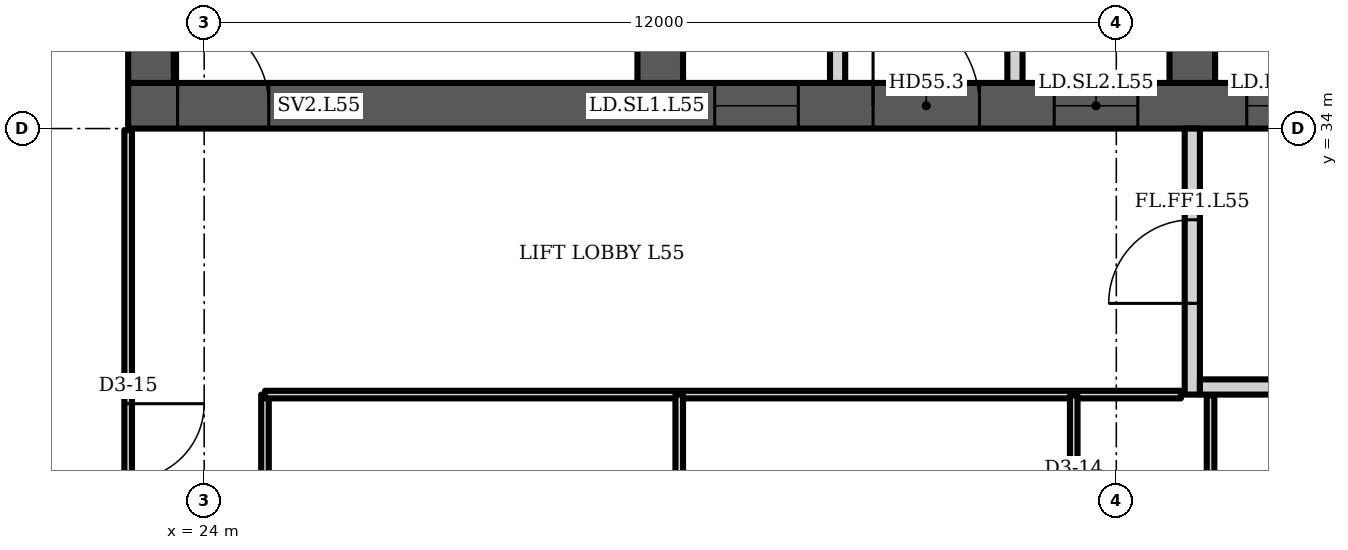
"""IFC4 building model, lengths in metres.
Left out: names, types, materials, properties, quantities, classifications, styles, units other than length and angle.
Written with IfcOpenShell. Run it as: python <this file> out.ifc"""

import sys

from ifc_helpers import new_model, si_unit, direction, frame, frame_2d, origin, place, context, subcontext, project, spatial, polyline, rectangle, outline, extrude, element, fill, save


model = new_model("IFC4")
c1 = context("Model", 3, precision=1e-05, world=origin(), true_north=direction((0.0, 1.0)))
c2 = subcontext(c1, "Body", "Model", "MODEL_VIEW")
j1 = project(units=[si_unit("LENGTHUNIT", "METRE"), si_unit("PLANEANGLEUNIT", "RADIAN")], contexts=[c1])
p1 = place(None, origin())
s1 = spatial("IfcSite", under=j1, at=p1, CompositionType="ELEMENT")
p2 = place(p1, origin())
s2 = spatial("IfcBuilding", under=s1, at=p2, CompositionType="ELEMENT")
p3 = place(p2, frame((0.0, 0.0, 221.5)))
s3 = spatial("IfcBuildingStorey", under=s2, at=p3, CompositionType="ELEMENT", Elevation=221.5)
p4 = place(p3, frame((23.0, 34.3, 0.0), z_axis=(0.0, 0.0, 1.0), x_axis=(1.0, 0.0, 0.0)))
e1 = element("IfcWall", 1, at=p4, inside=s3, PredefinedType="SHEAR", context=c2, shape_type="SweptSolid", body=[
    extrude(rectangle(XDim=35.0, YDim=0.6, at=frame_2d((17.5, 0.0))), origin(), (0.0, 0.0, 1.0), 3.6),
])
p5 = place(p4, frame((0.65, 0.0, 0.0)))
e2 = element("IfcOpeningElement", 2, at=p5, cuts=e1, PredefinedType="OPENING", context=c2, shape_type="SweptSolid", body=[
    extrude(rectangle(XDim=1.2, YDim=2.1, at=frame_2d((0.6, 1.05))), frame((0.0, 0.31, 0.0), z_axis=(0.0, -1.0, 0.0), x_axis=(1.0, 0.0, 0.0)), (0.0, 0.0, 1.0), 0.62),
])
p6 = place(p4, frame((7.717, 0.0, 0.0)))
e3 = element("IfcOpeningElement", 3, at=p6, cuts=e1, PredefinedType="OPENING", context=c2, shape_type="SweptSolid", body=[
    extrude(rectangle(XDim=1.1, YDim=2.1, at=frame_2d((0.55, 1.05))), frame((0.0, 0.31, 0.0), z_axis=(0.0, -1.0, 0.0), x_axis=(1.0, 0.0, 0.0)), (0.0, 0.0, 1.0), 0.62),
])
p7 = place(p4, frame((12.183, 0.0, 0.0)))
e4 = element("IfcOpeningElement", 4, at=p7, cuts=e1, PredefinedType="OPENING", context=c2, shape_type="SweptSolid", body=[
    extrude(rectangle(XDim=1.1, YDim=2.1, at=frame_2d((0.55, 1.05))), frame((0.0, 0.31, 0.0), z_axis=(0.0, -1.0, 0.0), x_axis=(1.0, 0.0, 0.0)), (0.0, 0.0, 1.0), 0.62),
])
p8 = place(p4, frame((9.8, 0.0, 0.0)))
e5 = element("IfcOpeningElement", 5, at=p8, cuts=e1, PredefinedType="OPENING", context=c2, shape_type="SweptSolid", body=[
    extrude(rectangle(XDim=1.4, YDim=2.1, at=frame_2d((0.7, 1.05))), frame((0.0, 0.31, 0.0), z_axis=(0.0, -1.0, 0.0), x_axis=(1.0, 0.0, 0.0)), (0.0, 0.0, 1.0), 0.62),
])
p9 = place(p4, frame((14.717, 0.0, 0.0)))
e6 = element("IfcOpeningElement", 6, at=p9, cuts=e1, PredefinedType="OPENING", context=c2, shape_type="SweptSolid", body=[
    extrude(rectangle(XDim=1.1, YDim=2.1, at=frame_2d((0.55, 1.05))), frame((0.0, 0.31, 0.0), z_axis=(0.0, -1.0, 0.0), x_axis=(1.0, 0.0, 0.0)), (0.0, 0.0, 1.0), 0.62),
])
p10 = place(p4, frame((16.95, 0.0, 0.0)))
e7 = element("IfcOpeningElement", 7, at=p10, cuts=e1, PredefinedType="OPENING", context=c2, shape_type="SweptSolid", body=[
    extrude(rectangle(XDim=1.1, YDim=2.1, at=frame_2d((0.55, 1.05))), frame((0.0, 0.31, 0.0), z_axis=(0.0, -1.0, 0.0), x_axis=(1.0, 0.0, 0.0)), (0.0, 0.0, 1.0), 0.62),
])
p11 = place(p4, frame((19.183, 0.0, 0.0)))
e8 = element("IfcOpeningElement", 8, at=p11, cuts=e1, PredefinedType="OPENING", context=c2, shape_type="SweptSolid", body=[
    extrude(rectangle(XDim=1.1, YDim=2.1, at=frame_2d((0.55, 1.05))), frame((0.0, 0.31, 0.0), z_axis=(0.0, -1.0, 0.0), x_axis=(1.0, 0.0, 0.0)), (0.0, 0.0, 1.0), 0.62),
])
p12 = place(p4, frame((26.15, 0.0, 0.0)))
e9 = element("IfcOpeningElement", 9, at=p12, cuts=e1, PredefinedType="OPENING", context=c2, shape_type="SweptSolid", body=[
    extrude(rectangle(XDim=1.2, YDim=2.1, at=frame_2d((0.6, 1.05))), frame((0.0, 0.31, 0.0), z_axis=(0.0, -1.0, 0.0), x_axis=(1.0, 0.0, 0.0)), (0.0, 0.0, 1.0), 0.62),
])
p13 = place(p4, frame((28.767, 0.0, 0.0)))
e10 = element("IfcOpeningElement", 10, at=p13, cuts=e1, PredefinedType="OPENING", context=c2, shape_type="SweptSolid", body=[
    extrude(rectangle(XDim=1.0, YDim=2.1, at=frame_2d((0.5, 1.05))), frame((0.0, 0.31, 0.0), z_axis=(0.0, -1.0, 0.0), x_axis=(1.0, 0.0, 0.0)), (0.0, 0.0, 1.0), 0.62),
])
p14 = place(p4, frame((33.083, 0.0, 0.0)))
e11 = element("IfcOpeningElement", 11, at=p14, cuts=e1, PredefinedType="OPENING", context=c2, shape_type="SweptSolid", body=[
    extrude(rectangle(XDim=1.0, YDim=2.1, at=frame_2d((0.5, 1.05))), frame((0.0, 0.31, 0.0), z_axis=(0.0, -1.0, 0.0), x_axis=(1.0, 0.0, 0.0)), (0.0, 0.0, 1.0), 0.62),
])
p15 = place(p4, frame((30.8, 0.0, 0.0)))
e12 = element("IfcOpeningElement", 12, at=p15, cuts=e1, PredefinedType="OPENING", context=c2, shape_type="SweptSolid", body=[
    extrude(rectangle(XDim=1.4, YDim=2.1, at=frame_2d((0.7, 1.05))), frame((0.0, 0.31, 0.0), z_axis=(0.0, -1.0, 0.0), x_axis=(1.0, 0.0, 0.0)), (0.0, 0.0, 1.0), 0.62),
])
p16 = place(p3, frame((23.3, 34.6, 0.0), z_axis=(0.0, 0.0, 1.0), x_axis=(0.0, 1.0, 0.0)))
e13 = element("IfcWall", 13, at=p16, inside=s3, PredefinedType="SHEAR", context=c2, shape_type="SweptSolid", body=[
    extrude(rectangle(XDim=13.585, YDim=0.6, at=frame_2d((6.792, 0.0))), origin(), (0.0, 0.0, 1.0), 3.6),
])
p17 = place(p3, frame((30.0, 34.6, 0.0), z_axis=(0.0, 0.0, 1.0), x_axis=(0.0, 1.0, 0.0)))
e14 = element("IfcWall", 14, at=p17, inside=s3, PredefinedType="SHEAR", context=c2, shape_type="SweptSolid", body=[
    extrude(rectangle(XDim=14.171, YDim=0.6, at=frame_2d((7.085, 0.0))), origin(), (0.0, 0.0, 1.0), 3.6),
])
p18 = place(p17, frame((3.8, 0.0, 0.0)))
e15 = element("IfcOpeningElement", 15, at=p18, cuts=e14, PredefinedType="OPENING", context=c2, shape_type="SweptSolid", body=[
    extrude(rectangle(XDim=1.1, YDim=2.1, at=frame_2d((0.55, 1.05))), frame((0.0, 0.31, 0.0), z_axis=(0.0, -1.0, 0.0), x_axis=(1.0, 0.0, 0.0)), (0.0, 0.0, 1.0), 0.62),
])
p19 = place(p3, frame((37.0, 34.6, 0.0), z_axis=(0.0, 0.0, 1.0), x_axis=(0.0, 1.0, 0.0)))
e16 = element("IfcWall", 16, at=p19, inside=s3, PredefinedType="SHEAR", context=c2, shape_type="SweptSolid", body=[
    extrude(rectangle(XDim=14.784, YDim=0.6, at=frame_2d((7.392, 0.0))), origin(), (0.0, 0.0, 1.0), 3.6),
])
p20 = place(p19, frame((11.302, 0.0, 0.0)))
e17 = element("IfcOpeningElement", 17, at=p20, cuts=e16, PredefinedType="OPENING", context=c2, shape_type="SweptSolid", body=[
    extrude(rectangle(XDim=1.0, YDim=2.1, at=frame_2d((0.5, 1.05))), frame((0.0, 0.31, 0.0), z_axis=(0.0, -1.0, 0.0), x_axis=(1.0, 0.0, 0.0)), (0.0, 0.0, 1.0), 0.62),
])
p21 = place(p19, frame((3.8, 0.0, 0.0)))
e18 = element("IfcOpeningElement", 18, at=p21, cuts=e16, PredefinedType="OPENING", context=c2, shape_type="SweptSolid", body=[
    extrude(rectangle(XDim=1.1, YDim=2.1, at=frame_2d((0.55, 1.05))), frame((0.0, 0.31, 0.0), z_axis=(0.0, -1.0, 0.0), x_axis=(1.0, 0.0, 0.0)), (0.0, 0.0, 1.0), 0.62),
])
p22 = place(p3, frame((0.0, 0.0, -0.0)))
e19 = element("IfcWall", 19, at=p22, inside=s3, PredefinedType="PARTITIONING", context=c2, shape_type="SweptSolid", body=[
    extrude(outline(polyline([(32.233, 37.45), (30.3, 37.45), (30.3, 37.65), (32.233, 37.65), (32.433, 37.65), (32.433, 34.6), (32.233, 34.6), (32.233, 37.45)])), origin(), (0.0, 0.0, 1.0), 3.2),
])
p23 = place(p3, frame((0.0, 0.0, -0.0)))
e20 = element("IfcWall", 20, at=p23, inside=s3, PredefinedType="PARTITIONING", context=c2, shape_type="SweptSolid", body=[
    extrude(outline(polyline([(34.567, 37.65), (34.767, 37.65), (36.7, 37.65), (36.7, 37.45), (34.767, 37.45), (34.767, 34.6), (34.567, 34.6), (34.567, 37.65)])), origin(), (0.0, 0.0, 1.0), 3.2),
])
p24 = place(p3, frame((0.0, 0.0, -0.0)))
e21 = element("IfcWall", 21, at=p24, inside=s3, PredefinedType="PARTITIONING", context=c2, shape_type="SweptSolid", body=[
    extrude(outline(polyline([(41.567, 37.1), (39.433, 37.1), (39.433, 34.6), (39.233, 34.6), (39.233, 37.45), (37.3, 37.45), (37.3, 37.65), (39.233, 37.65), (39.433, 37.65), (39.433, 37.3), (41.567, 37.3), (41.567, 37.35), (41.767, 37.35), (43.7, 37.35), (43.7, 37.15), (41.767, 37.15), (41.767, 34.6), (41.567, 34.6), (41.567, 37.1)])), origin(), (0.0, 0.0, 1.0), 3.2),
])
p25 = place(p3, frame((37.0, 30.5, 0.0), z_axis=(0.0, 0.0, 1.0), x_axis=(0.0, 1.0, 0.0)))
e22 = element("IfcWall", 22, at=p25, inside=s3, PredefinedType="PARTITIONING", context=c2, shape_type="SweptSolid", body=[
    extrude(rectangle(XDim=3.5, YDim=0.2, at=frame_2d((1.75, 0.0))), origin(), (0.0, 0.0, 1.0), 3.2),
])
p26 = place(p25, frame((1.2, 0.0, 0.0)))
e23 = element("IfcOpeningElement", 23, at=p26, cuts=e22, PredefinedType="OPENING", context=c2, shape_type="SweptSolid", body=[
    extrude(rectangle(XDim=1.1, YDim=2.1, at=frame_2d((0.55, 1.05))), frame((0.0, 0.11, 0.0), z_axis=(0.0, -1.0, 0.0), x_axis=(1.0, 0.0, 0.0)), (0.0, 0.0, 1.0), 0.22),
])
p27 = place(p3, frame((37.1, 30.6, 0.0), z_axis=(0.0, 0.0, 1.0), x_axis=(1.0, 0.0, 0.0)))
e24 = element("IfcWall", 24, at=p27, inside=s3, PredefinedType="PARTITIONING", context=c2, shape_type="SweptSolid", body=[
    extrude(rectangle(XDim=2.8, YDim=0.2, at=frame_2d((1.4, 0.0))), origin(), (0.0, 0.0, 1.0), 3.2),
])
p28 = place(p3, frame((23.0, 24.275, 0.0), z_axis=(0.0, 0.0, 1.0), x_axis=(0.0, 1.0, 0.0)))
e25 = element("IfcWall", 25, at=p28, inside=s3, PredefinedType="PARTITIONING", context=c2, shape_type="SweptSolid", body=[
    extrude(rectangle(XDim=9.705, YDim=0.1, at=frame_2d((4.853, 0.0))), origin(), (0.0, 0.0, 1.0), 3.2),
])
p29 = place(p28, frame((5.105, 0.0, 0.0)))
e26 = element("IfcOpeningElement", 26, at=p29, cuts=e25, PredefinedType="OPENING", context=c2, shape_type="SweptSolid", body=[
    extrude(rectangle(XDim=1.0, YDim=2.1, at=frame_2d((0.5, 1.05))), frame((0.0, 0.06, 0.0), z_axis=(0.0, -1.0, 0.0), x_axis=(1.0, 0.0, 0.0)), (0.0, 0.0, 1.0), 0.12),
])
p30 = place(p3, frame((24.8, 25.05, 0.0), z_axis=(0.0, 0.0, 1.0), x_axis=(0.0, 1.0, 0.0)))
e27 = element("IfcWall", 27, at=p30, inside=s3, PredefinedType="PARTITIONING", context=c2, shape_type="SweptSolid", body=[
    extrude(rectangle(XDim=5.45, YDim=0.1, at=frame_2d((2.725, 0.0))), origin(), (0.0, 0.0, 1.0), 3.2),
])
p31 = place(p30, frame((1.455, 0.0, 0.0)))
e28 = element("IfcOpeningElement", 28, at=p31, cuts=e27, PredefinedType="OPENING", context=c2, shape_type="SweptSolid", body=[
    extrude(rectangle(XDim=1.0, YDim=2.1, at=frame_2d((0.5, 1.05))), frame((0.0, 0.06, 0.0), z_axis=(0.0, -1.0, 0.0), x_axis=(1.0, 0.0, 0.0)), (0.0, 0.0, 1.0), 0.12),
])
p32 = place(p3, frame((24.8, 30.5, 0.0), z_axis=(0.0, 0.0, 1.0), x_axis=(1.0, 0.0, 0.0)))
e29 = element("IfcWall", 29, at=p32, inside=s3, PredefinedType="PARTITIONING", context=c2, shape_type="SweptSolid", body=[
    extrude(rectangle(XDim=12.05, YDim=0.1, at=frame_2d((6.025, 0.0))), origin(), (0.0, 0.0, 1.0), 3.2),
])
p33 = place(p3, frame((30.25, 17.0, 0.0), z_axis=(0.0, 0.0, 1.0), x_axis=(0.0, 1.0, 0.0)))
e30 = element("IfcWall", 30, at=p33, inside=s3, PredefinedType="PARTITIONING", context=c2, shape_type="SweptSolid", body=[
    extrude(rectangle(XDim=13.5, YDim=0.1, at=frame_2d((6.75, 0.0))), origin(), (0.0, 0.0, 1.0), 3.2),
])
p34 = place(p3, frame((35.44, 16.995, 0.0), z_axis=(0.0, 0.0, 1.0), x_axis=(0.0, 1.0, 0.0)))
e31 = element("IfcWall", 31, at=p34, inside=s3, PredefinedType="PARTITIONING", context=c2, shape_type="SweptSolid", body=[
    extrude(rectangle(XDim=13.495, YDim=0.1, at=frame_2d((6.748, 0.0))), origin(), (0.0, 0.0, 1.0), 3.2),
])
p35 = place(p34, frame((2.166, 0.0, 0.0)))
e32 = element("IfcOpeningElement", 32, at=p35, cuts=e31, PredefinedType="OPENING", context=c2, shape_type="SweptSolid", body=[
    extrude(rectangle(XDim=0.9, YDim=2.1, at=frame_2d((0.45, 1.05))), frame((0.0, 0.06, 0.0), z_axis=(0.0, -1.0, 0.0), x_axis=(1.0, 0.0, 0.0)), (0.0, 0.0, 1.0), 0.12),
])
p36 = place(p34, frame((7.215, 0.0, 0.0)))
e33 = element("IfcOpeningElement", 33, at=p36, cuts=e31, PredefinedType="OPENING", context=c2, shape_type="SweptSolid", body=[
    extrude(rectangle(XDim=0.9, YDim=2.1, at=frame_2d((0.45, 1.05))), frame((0.0, 0.06, 0.0), z_axis=(0.0, -1.0, 0.0), x_axis=(1.0, 0.0, 0.0)), (0.0, 0.0, 1.0), 0.12),
])
p37 = place(p34, frame((11.285, 0.0, 0.0)))
e34 = element("IfcOpeningElement", 34, at=p37, cuts=e31, PredefinedType="OPENING", context=c2, shape_type="SweptSolid", body=[
    extrude(rectangle(XDim=1.0, YDim=2.1, at=frame_2d((0.5, 1.05))), frame((0.0, 0.06, 0.0), z_axis=(0.0, -1.0, 0.0), x_axis=(1.0, 0.0, 0.0)), (0.0, 0.0, 1.0), 0.12),
])
p38 = place(p3, frame((37.24, 4.587, 0.0), z_axis=(0.0, 0.0, 1.0), x_axis=(0.0, 1.0, 0.0)))
e35 = element("IfcWall", 35, at=p38, inside=s3, PredefinedType="PARTITIONING", context=c2, shape_type="SweptSolid", body=[
    extrude(rectangle(XDim=25.903, YDim=0.1, at=frame_2d((12.952, 0.0))), origin(), (0.0, 0.0, 1.0), 2.58),
])
p39 = place(p38, frame((11.802, 0.0, 0.0)))
e36 = element("IfcOpeningElement", 36, at=p39, cuts=e35, PredefinedType="OPENING", context=c2, shape_type="SweptSolid", body=[
    extrude(rectangle(XDim=1.0, YDim=2.1, at=frame_2d((0.5, 1.05))), frame((0.0, 0.06, 0.0), z_axis=(0.0, -1.0, 0.0), x_axis=(1.0, 0.0, 0.0)), (0.0, 0.0, 1.0), 0.12),
])
p40 = place(p5, origin())
e37 = element("IfcDoor", 37, at=p40, inside=s3, OperationType="SINGLE_SWING_LEFT", PredefinedType="DOOR", context=c2, shape_type="SweptSolid", body=[
    extrude(rectangle(XDim=1.2, YDim=2.1, at=frame_2d((0.6, 1.05))), frame((0.0, 0.025, 0.0), z_axis=(0.0, -1.0, 0.0), x_axis=(1.0, 0.0, 0.0)), (0.0, 0.0, 1.0), 0.05),
])
fill(e2, e37)
p41 = place(p6, origin())
e38 = element("IfcDoor", 38, at=p41, inside=s3, OperationType="DOUBLE_DOOR_SLIDING", PredefinedType="DOOR", context=c2, shape_type="SweptSolid", body=[
    extrude(rectangle(XDim=1.1, YDim=2.1, at=frame_2d((0.55, 1.05))), frame((0.0, 0.025, 0.0), z_axis=(0.0, -1.0, 0.0), x_axis=(1.0, 0.0, 0.0)), (0.0, 0.0, 1.0), 0.05),
])
fill(e3, e38)
p42 = place(p7, origin())
e39 = element("IfcDoor", 39, at=p42, inside=s3, OperationType="DOUBLE_DOOR_SLIDING", PredefinedType="DOOR", context=c2, shape_type="SweptSolid", body=[
    extrude(rectangle(XDim=1.1, YDim=2.1, at=frame_2d((0.55, 1.05))), frame((0.0, 0.025, 0.0), z_axis=(0.0, -1.0, 0.0), x_axis=(1.0, 0.0, 0.0)), (0.0, 0.0, 1.0), 0.05),
])
fill(e4, e39)
p43 = place(p8, origin())
e40 = element("IfcDoor", 40, at=p43, inside=s3, OperationType="DOUBLE_DOOR_SINGLE_SWING", PredefinedType="DOOR", context=c2, shape_type="SweptSolid", body=[
    extrude(rectangle(XDim=1.4, YDim=2.1, at=frame_2d((0.7, 1.05))), frame((0.0, 0.025, 0.0), z_axis=(0.0, -1.0, 0.0), x_axis=(1.0, 0.0, 0.0)), (0.0, 0.0, 1.0), 0.05),
])
fill(e5, e40)
p44 = place(p9, origin())
e41 = element("IfcDoor", 41, at=p44, inside=s3, OperationType="DOUBLE_DOOR_SLIDING", PredefinedType="DOOR", context=c2, shape_type="SweptSolid", body=[
    extrude(rectangle(XDim=1.1, YDim=2.1, at=frame_2d((0.55, 1.05))), frame((0.0, 0.025, 0.0), z_axis=(0.0, -1.0, 0.0), x_axis=(1.0, 0.0, 0.0)), (0.0, 0.0, 1.0), 0.05),
])
fill(e6, e41)
p45 = place(p26, origin())
e42 = element("IfcDoor", 42, at=p45, inside=s3, OperationType="SINGLE_SWING_LEFT", PredefinedType="DOOR", context=c2, shape_type="SweptSolid", body=[
    extrude(rectangle(XDim=1.1, YDim=2.1, at=frame_2d((0.55, 1.05))), frame((0.0, 0.025, 0.0), z_axis=(0.0, -1.0, 0.0), x_axis=(1.0, 0.0, 0.0)), (0.0, 0.0, 1.0), 0.05),
])
fill(e23, e42)
p46 = place(p29, origin())
e43 = element("IfcDoor", 43, at=p46, inside=s3, OperationType="SINGLE_SWING_RIGHT", PredefinedType="DOOR", context=c2, shape_type="SweptSolid", body=[
    extrude(rectangle(XDim=1.0, YDim=2.1, at=frame_2d((0.5, 1.05))), frame((0.0, 0.025, 0.0), z_axis=(0.0, -1.0, 0.0), x_axis=(1.0, 0.0, 0.0)), (0.0, 0.0, 1.0), 0.05),
])
fill(e26, e43)
save(model, sys.argv[1])
